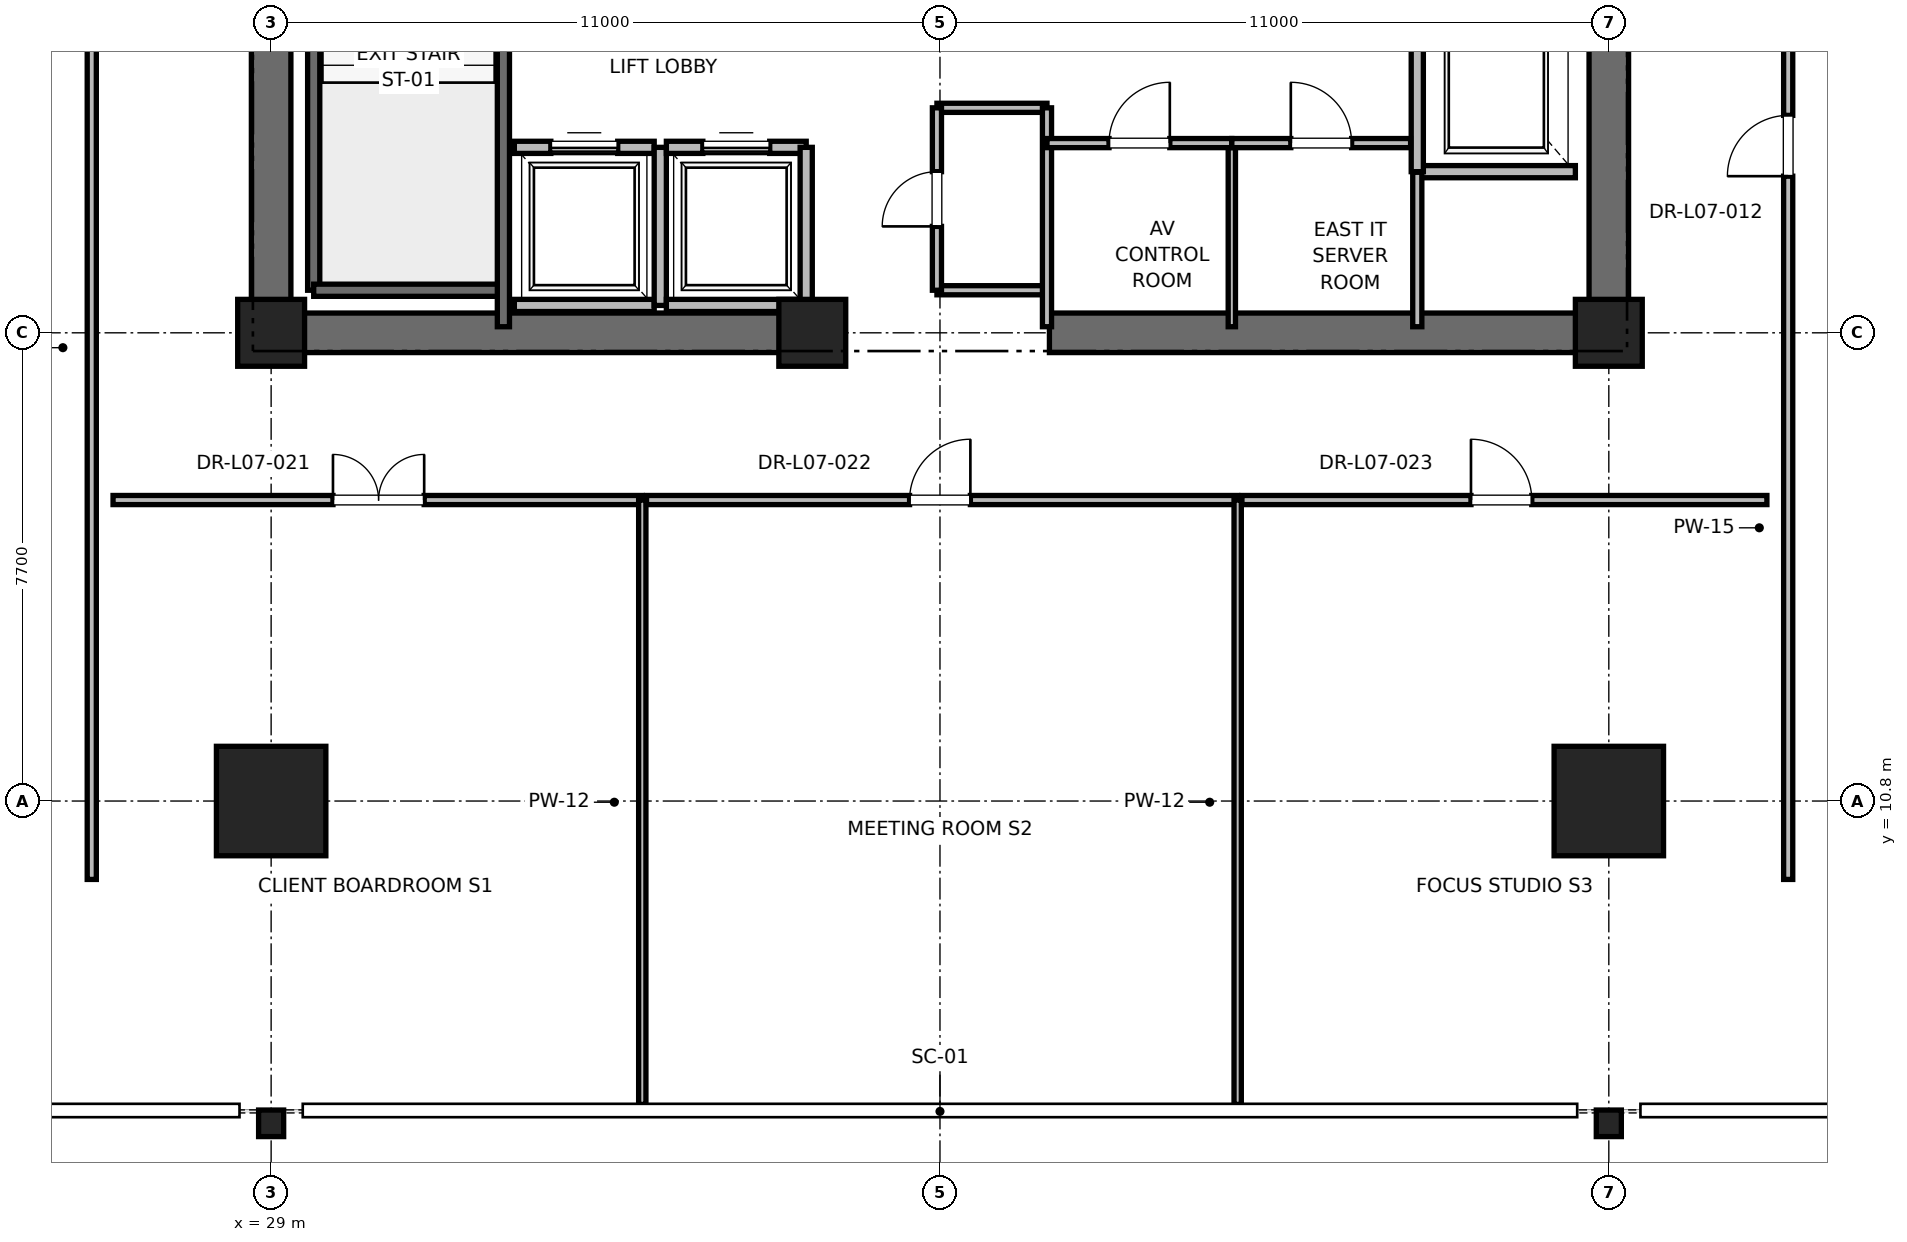
"""IFC4 building model, lengths in metres.
Left out: names, types, materials, properties, quantities, classifications, styles, units other than length and angle.
Written with IfcOpenShell. Run it as: python <this file> out.ifc"""

import sys

from ifc_helpers import new_model, si_unit, direction, frame, frame_2d, origin, origin_2d, place, context, subcontext, project, spatial, rectangle, i_section, extrude, element, fill, save


model = new_model("IFC4")
c1 = context("Model", 3, precision=1e-05, world=origin(), true_north=direction((0.0, 1.0)))
c2 = subcontext(c1, "Body", "Model", "MODEL_VIEW")
j1 = project(units=[si_unit("LENGTHUNIT", "METRE"), si_unit("PLANEANGLEUNIT", "RADIAN")], contexts=[c1])
p1 = place(None, origin())
s1 = spatial("IfcSite", under=j1, at=p1, CompositionType="ELEMENT")
p2 = place(p1, origin())
s2 = spatial("IfcBuilding", under=s1, at=p2, CompositionType="ELEMENT")
p3 = place(p2, frame((0.0, 0.0, 35.6)))
s3 = spatial("IfcBuildingStorey", under=s2, at=p3, CompositionType="ELEMENT", Elevation=35.6)
for number, where, z_axis, x_axis in (
    (1, (29.0, 10.8, 0.0), (0.0, 0.0, 1.0), (1.0, 0.0, 0.0)),
    (2, (51.0, 10.8, 0.0), (0.0, 0.0, 1.0), (1.0, 0.0, 0.0)),
):
    element("IfcColumn", number, at=place(p3, frame(where, z_axis=z_axis, x_axis=x_axis)), inside=s3, PredefinedType="COLUMN", context=c2, shape_type="SweptSolid", body=[
        extrude(rectangle(XDim=1.8, YDim=1.8, at=origin_2d()), origin(), (0.0, 0.0, 1.0), 4.0),
    ])
for number, where, z_axis, x_axis in (
    (3, (29.0, 5.5, 0.0), (0.0, 0.0, 1.0), (1.0, 0.0, 0.0)),
    (4, (51.0, 5.5, 0.0), (0.0, 0.0, 1.0), (1.0, 0.0, 0.0)),
):
    element("IfcColumn", number, at=place(p3, frame(where, z_axis=z_axis, x_axis=x_axis)), inside=s3, PredefinedType="COLUMN", context=c2, shape_type="SweptSolid", body=[
        extrude(i_section(OverallWidth=0.412, OverallDepth=0.437, WebThickness=0.036, FlangeThickness=0.058, FilletRadius=0.015, at=origin_2d()), origin(), (0.0, 0.0, 1.0), 4.0),
    ])
for number, where, z_axis, x_axis in (
    (5, (29.0, 18.5, 0.0), (0.0, 0.0, 1.0), (1.0, 0.0, 0.0)),
    (6, (51.0, 18.5, 0.0), (0.0, 0.0, 1.0), (1.0, 0.0, 0.0)),
    (7, (37.9, 18.5, 0.0), (0.0, 0.0, 1.0), (1.0, 0.0, 0.0)),
):
    element("IfcColumn", number, at=place(p3, frame(where, z_axis=z_axis, x_axis=x_axis)), inside=s3, PredefinedType="PILASTER", context=c2, shape_type="SweptSolid", body=[
        extrude(rectangle(XDim=1.1, YDim=1.1, at=origin_2d()), origin(), (0.0, 0.0, 1.0), 4.0),
    ])
for number, where, z_axis, x_axis in (
    (8, (29.0, 18.5, 0.0), (0.0, 0.0, 1.0), (1.0, 0.0, 0.0)),
    (9, (41.8, 18.5, 0.0), (0.0, 0.0, 1.0), (1.0, 0.0, 0.0)),
):
    element("IfcWall", number, at=place(p3, frame(where, z_axis=z_axis, x_axis=x_axis)), inside=s3, PredefinedType="SHEAR", context=c2, shape_type="SweptSolid", body=[
        extrude(rectangle(XDim=9.2, YDim=0.65, at=frame_2d((4.6, 0.0))), origin(), (0.0, 0.0, 1.0), 3.76),
    ])
p4 = place(p3, frame((29.0, 18.5, 0.0), z_axis=(0.0, 0.0, 1.0), x_axis=(0.0, 1.0, 0.0)))
e10 = element("IfcWall", 10, at=p4, inside=s3, PredefinedType="SHEAR", context=c2, shape_type="SweptSolid", body=[
    extrude(rectangle(XDim=8.8, YDim=0.65, at=frame_2d((4.4, 0.0))), origin(), (0.0, 0.0, 1.0), 3.76),
])
p5 = place(p3, frame((51.0, 18.5, 0.0), z_axis=(0.0, 0.0, 1.0), x_axis=(0.0, 1.0, 0.0)))
e11 = element("IfcWall", 11, at=p5, inside=s3, PredefinedType="SHEAR", context=c2, shape_type="SweptSolid", body=[
    extrude(rectangle(XDim=5.8, YDim=0.65, at=frame_2d((2.9, 0.0))), origin(), (0.0, 0.0, 1.0), 3.76),
])
p6 = place(p3, frame((29.7, 19.2, 0.0), z_axis=(0.0, 0.0, 1.0), x_axis=(0.0, 1.0, 0.0)))
e12 = element("IfcWall", 12, at=p6, inside=s3, PredefinedType="SOLIDWALL", context=c2, shape_type="SweptSolid", body=[
    extrude(rectangle(XDim=8.15, YDim=0.2, at=frame_2d((4.075, 0.0))), origin(), (0.0, 0.0, 1.0), 3.76),
])
p7 = place(p3, frame((29.7, 19.2, 0.0), z_axis=(0.0, 0.0, 1.0), x_axis=(1.0, 0.0, 0.0)))
e13 = element("IfcWall", 13, at=p7, inside=s3, PredefinedType="SOLIDWALL", context=c2, shape_type="SweptSolid", body=[
    extrude(rectangle(XDim=3.12, YDim=0.2, at=frame_2d((1.56, 0.0))), origin(), (0.0, 0.0, 1.0), 3.76),
])
p8 = place(p3, frame((32.82, 18.6, 0.0), z_axis=(0.0, 0.0, 1.0), x_axis=(0.0, 1.0, 0.0)))
e14 = element("IfcWall", 14, at=p8, inside=s3, PredefinedType="SOLIDWALL", context=c2, shape_type="SweptSolid", body=[
    extrude(rectangle(XDim=8.78, YDim=0.2, at=frame_2d((4.39, 0.0))), origin(), (0.0, 0.0, 1.0), 3.76),
])
p9 = place(p3, frame((47.85, 21.15, 0.0), z_axis=(0.0, 0.0, 1.0), x_axis=(1.0, 0.0, 0.0)))
e15 = element("IfcWall", 15, at=p9, inside=s3, PredefinedType="SOLIDWALL", context=c2, shape_type="SweptSolid", body=[
    extrude(rectangle(XDim=2.6, YDim=0.2, at=frame_2d((1.3, 0.0))), origin(), (0.0, 0.0, 1.0), 3.76),
])
p10 = place(p3, frame((47.85, 24.15, 0.0), z_axis=(0.0, 0.0, 1.0), x_axis=(0.0, -1.0, 0.0)))
e16 = element("IfcWall", 16, at=p10, inside=s3, PredefinedType="SOLIDWALL", context=c2, shape_type="SweptSolid", body=[
    extrude(rectangle(XDim=3.0, YDim=0.2, at=frame_2d((1.5, 0.0))), origin(), (0.0, 0.0, 1.0), 3.76),
])
p11 = place(p3, frame((33.0, 18.95, 0.0), z_axis=(0.0, 0.0, 1.0), x_axis=(1.0, 0.0, 0.0)))
e17 = element("IfcWall", 17, at=p11, inside=s3, PredefinedType="SOLIDWALL", context=c2, shape_type="SweptSolid", body=[
    extrude(rectangle(XDim=2.3, YDim=0.2, at=frame_2d((1.15, 0.0))), origin(), (0.0, 0.0, 1.0), 3.76),
])
p12 = place(p3, frame((35.3, 21.55, 0.0), z_axis=(0.0, 0.0, 1.0), x_axis=(-1.0, 0.0, 0.0)))
e18 = element("IfcWall", 18, at=p12, inside=s3, PredefinedType="SOLIDWALL", context=c2, shape_type="SweptSolid", body=[
    extrude(rectangle(XDim=2.3, YDim=0.2, at=frame_2d((1.15, 0.0))), origin(), (0.0, 0.0, 1.0), 3.76),
])
p13 = place(p12, frame((0.6, 0.0, 0.0)))
e19 = element("IfcOpeningElement", 19, at=p13, cuts=e18, PredefinedType="OPENING", context=c2, shape_type="SweptSolid", body=[
    extrude(rectangle(XDim=1.1, YDim=2.2, at=frame_2d((0.55, 1.1))), frame((0.0, 0.1, 0.0), z_axis=(0.0, -1.0, 0.0), x_axis=(1.0, 0.0, 0.0)), (0.0, 0.0, 1.0), 0.2),
])
p14 = place(p3, frame((35.4, 18.95, 0.0), z_axis=(0.0, 0.0, 1.0), x_axis=(0.0, 1.0, 0.0)))
e20 = element("IfcWall", 20, at=p14, inside=s3, PredefinedType="SOLIDWALL", context=c2, shape_type="SweptSolid", body=[
    extrude(rectangle(XDim=2.6, YDim=0.2, at=frame_2d((1.3, 0.0))), origin(), (0.0, 0.0, 1.0), 3.76),
])
p15 = place(p3, frame((35.5, 18.95, 0.0), z_axis=(0.0, 0.0, 1.0), x_axis=(1.0, 0.0, 0.0)))
e21 = element("IfcWall", 21, at=p15, inside=s3, PredefinedType="SOLIDWALL", context=c2, shape_type="SweptSolid", body=[
    extrude(rectangle(XDim=2.3, YDim=0.2, at=frame_2d((1.15, 0.0))), origin(), (0.0, 0.0, 1.0), 2.54),
])
p16 = place(p3, frame((37.8, 21.55, 0.0), z_axis=(0.0, 0.0, 1.0), x_axis=(-1.0, 0.0, 0.0)))
e22 = element("IfcWall", 22, at=p16, inside=s3, PredefinedType="SOLIDWALL", context=c2, shape_type="SweptSolid", body=[
    extrude(rectangle(XDim=2.3, YDim=0.2, at=frame_2d((1.15, 0.0))), origin(), (0.0, 0.0, 1.0), 3.76),
])
p17 = place(p16, frame((0.6, 0.0, 0.0)))
e23 = element("IfcOpeningElement", 23, at=p17, cuts=e22, PredefinedType="OPENING", context=c2, shape_type="SweptSolid", body=[
    extrude(rectangle(XDim=1.1, YDim=2.2, at=frame_2d((0.55, 1.1))), frame((0.0, 0.1, 0.0), z_axis=(0.0, -1.0, 0.0), x_axis=(1.0, 0.0, 0.0)), (0.0, 0.0, 1.0), 0.2),
])
p18 = place(p3, frame((37.8, 18.95, 0.0), z_axis=(0.0, 0.0, 1.0), x_axis=(0.0, 1.0, 0.0)))
e24 = element("IfcWall", 24, at=p18, inside=s3, PredefinedType="SOLIDWALL", context=c2, shape_type="SweptSolid", body=[
    extrude(rectangle(XDim=2.6, YDim=0.2, at=frame_2d((1.3, 0.0))), origin(), (0.0, 0.0, 1.0), 2.54),
])
for number, where, z_axis, x_axis in (
    (25, (39.95, 19.2, 0.0), (0.0, 0.0, 1.0), (1.0, 0.0, 0.0)),
    (26, (39.95, 22.2, 0.0), (0.0, 0.0, 1.0), (1.0, 0.0, 0.0)),
):
    element("IfcWall", number, at=place(p3, frame(where, z_axis=z_axis, x_axis=x_axis)), inside=s3, PredefinedType="PARTITIONING", context=c2, shape_type="SweptSolid", body=[
        extrude(rectangle(XDim=1.81, YDim=0.15, at=frame_2d((0.905, 0.0))), origin(), (0.0, 0.0, 1.0), 2.85),
    ])
p19 = place(p3, frame((41.76, 18.6, 0.0), z_axis=(0.0, 0.0, 1.0), x_axis=(0.0, 1.0, 0.0)))
e27 = element("IfcWall", 27, at=p19, inside=s3, PredefinedType="PARTITIONING", context=c2, shape_type="SweptSolid", body=[
    extrude(rectangle(XDim=3.6, YDim=0.15, at=frame_2d((1.8, 0.0))), origin(), (0.0, 0.0, 1.0), 2.54),
])
p20 = place(p3, frame((39.95, 19.2, 0.0), z_axis=(0.0, 0.0, 1.0), x_axis=(0.0, 1.0, 0.0)))
e28 = element("IfcWall", 28, at=p20, inside=s3, PredefinedType="PARTITIONING", context=c2, shape_type="SweptSolid", body=[
    extrude(rectangle(XDim=3.0, YDim=0.15, at=frame_2d((1.5, 0.0))), origin(), (0.0, 0.0, 1.0), 2.85),
])
p21 = place(p20, frame((1.05, 0.0, 0.0)))
e29 = element("IfcOpeningElement", 29, at=p21, cuts=e28, PredefinedType="OPENING", context=c2, shape_type="SweptSolid", body=[
    extrude(rectangle(XDim=0.9, YDim=2.1, at=frame_2d((0.45, 1.05))), frame((0.0, 0.075, 0.0), z_axis=(0.0, -1.0, 0.0), x_axis=(1.0, 0.0, 0.0)), (0.0, 0.0, 1.0), 0.15),
])
p22 = place(p3, frame((47.85, 18.6, 0.0), z_axis=(0.0, 0.0, 1.0), x_axis=(0.0, 1.0, 0.0)))
e30 = element("IfcWall", 30, at=p22, inside=s3, PredefinedType="PARTITIONING", context=c2, shape_type="SweptSolid", body=[
    extrude(rectangle(XDim=2.54, YDim=0.15, at=frame_2d((1.27, 0.0))), origin(), (0.0, 0.0, 1.0), 2.85),
])
p23 = place(p3, frame((44.8, 18.6, 0.0), z_axis=(0.0, 0.0, 1.0), x_axis=(0.0, 1.0, 0.0)))
e31 = element("IfcWall", 31, at=p23, inside=s3, PredefinedType="PARTITIONING", context=c2, shape_type="SweptSolid", body=[
    extrude(rectangle(XDim=3.02, YDim=0.12, at=frame_2d((1.51, 0.0))), origin(), (0.0, 0.0, 1.0), 2.85),
])
p24 = place(p3, frame((41.76, 21.62, 0.0), z_axis=(0.0, 0.0, 1.0), x_axis=(1.0, 0.0, 0.0)))
e32 = element("IfcWall", 32, at=p24, inside=s3, PredefinedType="PARTITIONING", context=c2, shape_type="SweptSolid", body=[
    extrude(rectangle(XDim=3.04, YDim=0.15, at=frame_2d((1.52, 0.0))), origin(), (0.0, 0.0, 1.0), 2.85),
])
p25 = place(p24, frame((1.02, 0.0, 0.0)))
e33 = element("IfcOpeningElement", 33, at=p25, cuts=e32, PredefinedType="OPENING", context=c2, shape_type="SweptSolid", body=[
    extrude(rectangle(XDim=1.0, YDim=2.15, at=frame_2d((0.5, 1.075))), frame((0.0, 0.075, 0.0), z_axis=(0.0, -1.0, 0.0), x_axis=(1.0, 0.0, 0.0)), (0.0, 0.0, 1.0), 0.15),
])
p26 = place(p3, frame((44.8, 21.62, 0.0), z_axis=(0.0, 0.0, 1.0), x_axis=(1.0, 0.0, 0.0)))
e34 = element("IfcWall", 34, at=p26, inside=s3, PredefinedType="PARTITIONING", context=c2, shape_type="SweptSolid", body=[
    extrude(rectangle(XDim=2.94, YDim=0.15, at=frame_2d((1.47, 0.0))), origin(), (0.0, 0.0, 1.0), 2.85),
])
p27 = place(p26, frame((0.97, 0.0, 0.0)))
e35 = element("IfcOpeningElement", 35, at=p27, cuts=e34, PredefinedType="OPENING", context=c2, shape_type="SweptSolid", body=[
    extrude(rectangle(XDim=1.0, YDim=2.15, at=frame_2d((0.5, 1.075))), frame((0.0, 0.075, 0.0), z_axis=(0.0, -1.0, 0.0), x_axis=(1.0, 0.0, 0.0)), (0.0, 0.0, 1.0), 0.15),
])
p28 = place(p3, frame((26.4, 15.75, 0.0), z_axis=(0.0, 0.0, 1.0), x_axis=(1.0, 0.0, 0.0)))
e36 = element("IfcWall", 36, at=p28, inside=s3, PredefinedType="PARTITIONING", context=c2, shape_type="SweptSolid", body=[
    extrude(rectangle(XDim=8.704, YDim=0.15, at=frame_2d((4.352, 0.0))), origin(), (0.0, 0.0, 1.0), 2.85),
])
p29 = place(p28, frame((3.617, 0.0, 0.0)))
e37 = element("IfcOpeningElement", 37, at=p29, cuts=e36, PredefinedType="OPENING", context=c2, shape_type="SweptSolid", body=[
    extrude(rectangle(XDim=1.5, YDim=2.25, at=frame_2d((0.75, 1.125))), frame((0.0, 0.075, 0.0), z_axis=(0.0, -1.0, 0.0), x_axis=(1.0, 0.0, 0.0)), (0.0, 0.0, 1.0), 0.15),
])
p30 = place(p3, frame((35.104, 5.811, 0.0), z_axis=(0.0, 0.0, 1.0), x_axis=(0.0, 1.0, 0.0)))
e38 = element("IfcWall", 38, at=p30, inside=s3, PredefinedType="PARTITIONING", context=c2, shape_type="SweptSolid", body=[
    extrude(rectangle(XDim=9.939, YDim=0.12, at=frame_2d((4.97, 0.0))), origin(), (0.0, 0.0, 1.0), 2.39),
])
p31 = place(p3, frame((35.174, 15.75, 0.0), z_axis=(0.0, 0.0, 1.0), x_axis=(1.0, 0.0, 0.0)))
e39 = element("IfcWall", 39, at=p31, inside=s3, PredefinedType="PARTITIONING", context=c2, shape_type="SweptSolid", body=[
    extrude(rectangle(XDim=9.722, YDim=0.15, at=frame_2d((4.861, 0.0))), origin(), (0.0, 0.0, 1.0), 2.85),
])
p32 = place(p31, frame((4.326, 0.0, 0.0)))
e40 = element("IfcOpeningElement", 40, at=p32, cuts=e39, PredefinedType="OPENING", context=c2, shape_type="SweptSolid", body=[
    extrude(rectangle(XDim=1.0, YDim=2.15, at=frame_2d((0.5, 1.075))), frame((0.0, 0.075, 0.0), z_axis=(0.0, -1.0, 0.0), x_axis=(1.0, 0.0, 0.0)), (0.0, 0.0, 1.0), 0.15),
])
p33 = place(p3, frame((44.896, 5.811, 0.0), z_axis=(0.0, 0.0, 1.0), x_axis=(0.0, 1.0, 0.0)))
e41 = element("IfcWall", 41, at=p33, inside=s3, PredefinedType="PARTITIONING", context=c2, shape_type="SweptSolid", body=[
    extrude(rectangle(XDim=9.939, YDim=0.12, at=frame_2d((4.97, 0.0))), origin(), (0.0, 0.0, 1.0), 2.39),
])
p34 = place(p3, frame((44.966, 15.75, 0.0), z_axis=(0.0, 0.0, 1.0), x_axis=(1.0, 0.0, 0.0)))
e42 = element("IfcWall", 42, at=p34, inside=s3, PredefinedType="PARTITIONING", context=c2, shape_type="SweptSolid", body=[
    extrude(rectangle(XDim=8.634, YDim=0.15, at=frame_2d((4.317, 0.0))), origin(), (0.0, 0.0, 1.0), 2.85),
])
p35 = place(p34, frame((3.767, 0.0, 0.0)))
e43 = element("IfcOpeningElement", 43, at=p35, cuts=e42, PredefinedType="OPENING", context=c2, shape_type="SweptSolid", body=[
    extrude(rectangle(XDim=1.0, YDim=2.15, at=frame_2d((0.5, 1.075))), frame((0.0, 0.075, 0.0), z_axis=(0.0, -1.0, 0.0), x_axis=(1.0, 0.0, 0.0)), (0.0, 0.0, 1.0), 0.15),
])
p36 = place(p3, frame((26.05, 9.511, 0.0), z_axis=(0.0, 0.0, 1.0), x_axis=(0.0, 1.0, 0.0)))
e44 = element("IfcWall", 44, at=p36, inside=s3, PredefinedType="PARTITIONING", context=c2, shape_type="SweptSolid", body=[
    extrude(rectangle(XDim=35.979, YDim=0.15, at=frame_2d((17.989, 0.0))), origin(), (0.0, 0.0, 1.0), 2.85),
])
p37 = place(p36, frame((17.489, 0.0, 0.0)))
e45 = element("IfcOpeningElement", 45, at=p37, cuts=e44, PredefinedType="OPENING", context=c2, shape_type="SweptSolid", body=[
    extrude(rectangle(XDim=1.0, YDim=2.15, at=frame_2d((0.5, 1.075))), frame((0.0, 0.075, 0.0), z_axis=(0.0, -1.0, 0.0), x_axis=(1.0, 0.0, 0.0)), (0.0, 0.0, 1.0), 0.15),
])
p38 = place(p3, frame((53.95, 9.511, 0.0), z_axis=(0.0, 0.0, 1.0), x_axis=(0.0, 1.0, 0.0)))
e46 = element("IfcWall", 46, at=p38, inside=s3, PredefinedType="PARTITIONING", context=c2, shape_type="SweptSolid", body=[
    extrude(rectangle(XDim=15.111, YDim=0.15, at=frame_2d((7.555, 0.0))), origin(), (0.0, 0.0, 1.0), 2.85),
])
p39 = place(p38, frame((11.565, 0.0, 0.0)))
e47 = element("IfcOpeningElement", 47, at=p39, cuts=e46, PredefinedType="OPENING", context=c2, shape_type="SweptSolid", body=[
    extrude(rectangle(XDim=1.0, YDim=2.15, at=frame_2d((0.5, 1.075))), frame((0.0, 0.075, 0.0), z_axis=(0.0, -1.0, 0.0), x_axis=(1.0, 0.0, 0.0)), (0.0, 0.0, 1.0), 0.15),
])
p40 = place(p13, origin())
e48 = element("IfcDoor", 48, at=p40, inside=s3, OperationType="SLIDING_TO_RIGHT", PredefinedType="DOOR", context=c2, shape_type="SweptSolid", body=[
    extrude(rectangle(XDim=1.1, YDim=2.2, at=frame_2d((0.55, 1.1))), frame((0.0, 0.025, 0.0), z_axis=(0.0, -1.0, 0.0), x_axis=(1.0, 0.0, 0.0)), (0.0, 0.0, 1.0), 0.05),
])
fill(e19, e48)
p41 = place(p17, origin())
e49 = element("IfcDoor", 49, at=p41, inside=s3, OperationType="SLIDING_TO_RIGHT", PredefinedType="DOOR", context=c2, shape_type="SweptSolid", body=[
    extrude(rectangle(XDim=1.1, YDim=2.2, at=frame_2d((0.55, 1.1))), frame((0.0, 0.025, 0.0), z_axis=(0.0, -1.0, 0.0), x_axis=(1.0, 0.0, 0.0)), (0.0, 0.0, 1.0), 0.05),
])
fill(e23, e49)
p42 = place(p21, origin())
e50 = element("IfcDoor", 50, at=p42, inside=s3, OperationType="SINGLE_SWING_LEFT", PredefinedType="DOOR", context=c2, shape_type="SweptSolid", body=[
    extrude(rectangle(XDim=0.9, YDim=2.1, at=frame_2d((0.45, 1.05))), frame((0.0, 0.025, 0.0), z_axis=(0.0, -1.0, 0.0), x_axis=(1.0, 0.0, 0.0)), (0.0, 0.0, 1.0), 0.05),
])
fill(e29, e50)
p43 = place(p25, origin())
e51 = element("IfcDoor", 51, at=p43, inside=s3, OperationType="SINGLE_SWING_RIGHT", PredefinedType="DOOR", context=c2, shape_type="SweptSolid", body=[
    extrude(rectangle(XDim=1.0, YDim=2.15, at=frame_2d((0.5, 1.075))), frame((0.0, 0.025, 0.0), z_axis=(0.0, -1.0, 0.0), x_axis=(1.0, 0.0, 0.0)), (0.0, 0.0, 1.0), 0.05),
])
fill(e33, e51)
p44 = place(p27, origin())
e52 = element("IfcDoor", 52, at=p44, inside=s3, OperationType="SINGLE_SWING_LEFT", PredefinedType="DOOR", context=c2, shape_type="SweptSolid", body=[
    extrude(rectangle(XDim=1.0, YDim=2.15, at=frame_2d((0.5, 1.075))), frame((0.0, 0.025, 0.0), z_axis=(0.0, -1.0, 0.0), x_axis=(1.0, 0.0, 0.0)), (0.0, 0.0, 1.0), 0.05),
])
fill(e35, e52)
p45 = place(p29, origin())
e53 = element("IfcDoor", 53, at=p45, inside=s3, OperationType="DOUBLE_DOOR_SINGLE_SWING", PredefinedType="DOOR", context=c2, shape_type="SweptSolid", body=[
    extrude(rectangle(XDim=1.5, YDim=2.25, at=frame_2d((0.75, 1.125))), frame((0.0, 0.025, 0.0), z_axis=(0.0, -1.0, 0.0), x_axis=(1.0, 0.0, 0.0)), (0.0, 0.0, 1.0), 0.05),
])
fill(e37, e53)
p46 = place(p32, origin())
e54 = element("IfcDoor", 54, at=p46, inside=s3, OperationType="SINGLE_SWING_RIGHT", PredefinedType="DOOR", context=c2, shape_type="SweptSolid", body=[
    extrude(rectangle(XDim=1.0, YDim=2.15, at=frame_2d((0.5, 1.075))), frame((0.0, 0.025, 0.0), z_axis=(0.0, -1.0, 0.0), x_axis=(1.0, 0.0, 0.0)), (0.0, 0.0, 1.0), 0.05),
])
fill(e40, e54)
p47 = place(p35, origin())
e55 = element("IfcDoor", 55, at=p47, inside=s3, OperationType="SINGLE_SWING_LEFT", PredefinedType="DOOR", context=c2, shape_type="SweptSolid", body=[
    extrude(rectangle(XDim=1.0, YDim=2.15, at=frame_2d((0.5, 1.075))), frame((0.0, 0.025, 0.0), z_axis=(0.0, -1.0, 0.0), x_axis=(1.0, 0.0, 0.0)), (0.0, 0.0, 1.0), 0.05),
])
fill(e43, e55)
p48 = place(p39, origin())
e56 = element("IfcDoor", 56, at=p48, inside=s3, OperationType="SINGLE_SWING_LEFT", PredefinedType="DOOR", context=c2, shape_type="SweptSolid", body=[
    extrude(rectangle(XDim=1.0, YDim=2.15, at=frame_2d((0.5, 1.075))), frame((0.0, 0.025, 0.0), z_axis=(0.0, -1.0, 0.0), x_axis=(1.0, 0.0, 0.0)), (0.0, 0.0, 1.0), 0.05),
])
fill(e47, e56)
save(model, sys.argv[1])
